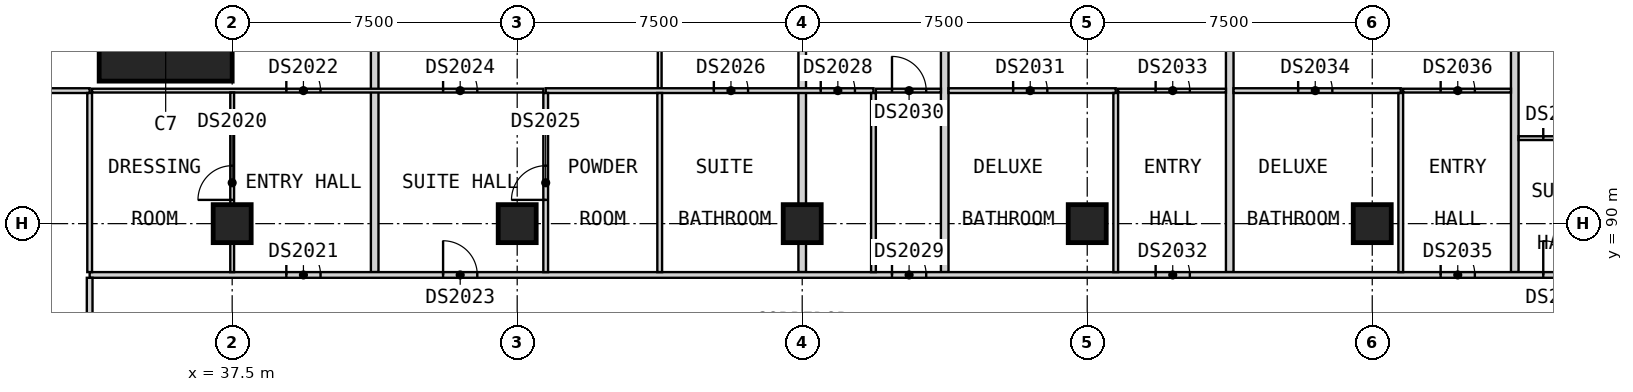
"""IFC4 building model, lengths in metres.
Left out: names, types, materials, properties, quantities, classifications, styles, units other than length and angle.
Written with IfcOpenShell. Run it as: python <this file> out.ifc"""

import sys

from ifc_helpers import new_model, si_unit, direction, frame, frame_2d, origin, origin_2d, place, context, subcontext, project, spatial, rectangle, extrude, element, fill, save


model = new_model("IFC4")
c1 = context("Model", 3, precision=1e-05, world=origin(), true_north=direction((0.0, 1.0)))
c2 = subcontext(c1, "Body", "Model", "MODEL_VIEW")
j1 = project(units=[si_unit("LENGTHUNIT", "METRE"), si_unit("PLANEANGLEUNIT", "RADIAN")], contexts=[c1])
p1 = place(None, origin())
s1 = spatial("IfcSite", under=j1, at=p1, CompositionType="ELEMENT")
p2 = place(p1, origin())
s2 = spatial("IfcBuilding", under=s1, at=p2, CompositionType="ELEMENT")
p3 = place(p2, frame((0.0, 0.0, 162.6)))
s3 = spatial("IfcBuildingStorey", under=s2, at=p3, CompositionType="ELEMENT", Elevation=162.6)
for number, where, z_axis, x_axis in (
    (1, (37.5, 90.0, 0.0), (0.0, 0.0, 1.0), (1.0, 0.0, 0.0)),
    (2, (45.0, 90.0, 0.0), (0.0, 0.0, 1.0), (1.0, 0.0, 0.0)),
    (3, (52.5, 90.0, 0.0), (0.0, 0.0, 1.0), (1.0, 0.0, 0.0)),
    (4, (60.0, 90.0, 0.0), (0.0, 0.0, 1.0), (1.0, 0.0, 0.0)),
    (5, (67.5, 90.0, 0.0), (0.0, 0.0, 1.0), (1.0, 0.0, 0.0)),
):
    element("IfcColumn", number, at=place(p3, frame(where, z_axis=z_axis, x_axis=x_axis)), inside=s3, PredefinedType="COLUMN", context=c2, shape_type="SweptSolid", body=[
        extrude(rectangle(XDim=1.0, YDim=1.0, at=origin_2d()), origin(), (0.0, 0.0, 1.0), 3.6),
    ])
p4 = place(p3, frame((35.75, 95.5, 0.0), z_axis=(0.0, 0.0, 1.0), x_axis=(1.0, 0.0, 0.0)))
e6 = element("IfcColumn", 6, at=p4, inside=s3, PredefinedType="COLUMN", context=c2, shape_type="SweptSolid", body=[
    extrude(rectangle(XDim=3.5, YDim=3.5, at=origin_2d()), origin(), (0.0, 0.0, 1.0), 3.6),
])
p5 = place(p3, frame((41.25, 88.725, 0.0), z_axis=(0.0, 0.0, 1.0), x_axis=(0.0, 1.0, 0.0)))
e7 = element("IfcWall", 7, at=p5, inside=s3, PredefinedType="PARTITIONING", context=c2, shape_type="SweptSolid", body=[
    extrude(rectangle(XDim=11.715, YDim=0.2, at=frame_2d((5.857, 0.0))), origin(), (0.0, 0.0, 1.0), 3.2),
])
p6 = place(p3, frame((52.5, 88.725, 0.0), z_axis=(0.0, 0.0, 1.0), x_axis=(0.0, 1.0, 0.0)))
e8 = element("IfcWall", 8, at=p6, inside=s3, PredefinedType="PARTITIONING", context=c2, shape_type="SweptSolid", body=[
    extrude(rectangle(XDim=12.525, YDim=0.2, at=frame_2d((6.262, 0.0))), origin(), (0.0, 0.0, 1.0), 3.2),
])
for number, where, z_axis, x_axis in (
    (9, (56.25, 88.725, 0.0), (0.0, 0.0, 1.0), (0.0, 1.0, 0.0)),
    (10, (63.75, 88.725, 0.0), (0.0, 0.0, 1.0), (0.0, 1.0, 0.0)),
    (11, (71.25, 88.725, 0.0), (0.0, 0.0, 1.0), (0.0, 1.0, 0.0)),
):
    element("IfcWall", number, at=place(p3, frame(where, z_axis=z_axis, x_axis=x_axis)), inside=s3, PredefinedType="PARTITIONING", context=c2, shape_type="SweptSolid", body=[
        extrude(rectangle(XDim=11.715, YDim=0.2, at=frame_2d((5.857, 0.0))), origin(), (0.0, 0.0, 1.0), 3.2),
    ])
p7 = place(p3, frame((33.75, 88.65, 0.0), z_axis=(0.0, 0.0, 1.0), x_axis=(1.0, 0.0, 0.0)))
e12 = element("IfcWall", 12, at=p7, inside=s3, PredefinedType="PARTITIONING", context=c2, shape_type="SweptSolid", body=[
    extrude(rectangle(XDim=39.9, YDim=0.15, at=frame_2d((19.95, 0.0))), origin(), (0.0, 0.0, 1.0), 3.2),
])
p8 = place(p7, frame((5.175, 0.0, 0.0)))
e13 = element("IfcOpeningElement", 13, at=p8, cuts=e12, PredefinedType="OPENING", context=c2, shape_type="SweptSolid", body=[
    extrude(rectangle(XDim=0.9, YDim=2.1, at=frame_2d((0.45, 1.05))), frame((0.0, 0.085, 0.0), z_axis=(0.0, -1.0, 0.0), x_axis=(1.0, 0.0, 0.0)), (0.0, 0.0, 1.0), 0.17),
])
p9 = place(p7, frame((9.3, 0.0, 0.0)))
e14 = element("IfcOpeningElement", 14, at=p9, cuts=e12, PredefinedType="OPENING", context=c2, shape_type="SweptSolid", body=[
    extrude(rectangle(XDim=0.9, YDim=2.1, at=frame_2d((0.45, 1.05))), frame((0.0, 0.085, 0.0), z_axis=(0.0, -1.0, 0.0), x_axis=(1.0, 0.0, 0.0)), (0.0, 0.0, 1.0), 0.17),
])
p10 = place(p7, frame((21.113, 0.0, 0.0)))
e15 = element("IfcOpeningElement", 15, at=p10, cuts=e12, PredefinedType="OPENING", context=c2, shape_type="SweptSolid", body=[
    extrude(rectangle(XDim=0.9, YDim=2.1, at=frame_2d((0.45, 1.05))), frame((0.0, 0.085, 0.0), z_axis=(0.0, -1.0, 0.0), x_axis=(1.0, 0.0, 0.0)), (0.0, 0.0, 1.0), 0.17),
])
p11 = place(p7, frame((28.05, 0.0, 0.0)))
e16 = element("IfcOpeningElement", 16, at=p11, cuts=e12, PredefinedType="OPENING", context=c2, shape_type="SweptSolid", body=[
    extrude(rectangle(XDim=0.9, YDim=2.1, at=frame_2d((0.45, 1.05))), frame((0.0, 0.085, 0.0), z_axis=(0.0, -1.0, 0.0), x_axis=(1.0, 0.0, 0.0)), (0.0, 0.0, 1.0), 0.17),
])
p12 = place(p7, frame((35.55, 0.0, 0.0)))
e17 = element("IfcOpeningElement", 17, at=p12, cuts=e12, PredefinedType="OPENING", context=c2, shape_type="SweptSolid", body=[
    extrude(rectangle(XDim=0.9, YDim=2.1, at=frame_2d((0.45, 1.05))), frame((0.0, 0.085, 0.0), z_axis=(0.0, -1.0, 0.0), x_axis=(1.0, 0.0, 0.0)), (0.0, 0.0, 1.0), 0.17),
])
p13 = place(p7, frame((38.25, 0.0, 0.0)))
e18 = element("IfcOpeningElement", 18, at=p13, cuts=e12, PredefinedType="OPENING", context=c2, shape_type="SweptSolid", body=[
    extrude(rectangle(XDim=0.9, YDim=2.1, at=frame_2d((0.45, 1.05))), frame((0.0, 0.085, 0.0), z_axis=(0.0, -1.0, 0.0), x_axis=(1.0, 0.0, 0.0)), (0.0, 0.0, 1.0), 0.17),
])
p14 = place(p3, frame((33.75, 86.35, 0.0), z_axis=(0.0, 0.0, 1.0), x_axis=(0.0, 1.0, 0.0)))
e19 = element("IfcWall", 19, at=p14, inside=s3, PredefinedType="PARTITIONING", context=c2, shape_type="SweptSolid", body=[
    extrude(rectangle(XDim=2.225, YDim=0.15, at=frame_2d((1.112, 0.0))), origin(), (0.0, 0.0, 1.0), 3.2),
])
p15 = place(p3, frame((71.35, 92.25, 0.0), z_axis=(0.0, 0.0, 1.0), x_axis=(1.0, 0.0, 0.0)))
e20 = element("IfcWall", 20, at=p15, inside=s3, PredefinedType="PARTITIONING", context=c2, shape_type="SweptSolid", body=[
    extrude(rectangle(XDim=7.35, YDim=0.1, at=frame_2d((3.675, 0.0))), origin(), (0.0, 0.0, 1.0), 3.2),
])
p16 = place(p15, frame((0.65, 0.0, 0.0)))
e21 = element("IfcOpeningElement", 21, at=p16, cuts=e20, PredefinedType="OPENING", context=c2, shape_type="SweptSolid", body=[
    extrude(rectangle(XDim=0.9, YDim=2.1, at=frame_2d((0.45, 1.05))), frame((0.0, 0.06, 0.0), z_axis=(0.0, -1.0, 0.0), x_axis=(1.0, 0.0, 0.0)), (0.0, 0.0, 1.0), 0.12),
])
p17 = place(p3, frame((33.812, 93.5, 0.0), z_axis=(0.0, 0.0, 1.0), x_axis=(1.0, 0.0, 0.0)))
e22 = element("IfcWall", 22, at=p17, inside=s3, PredefinedType="PARTITIONING", context=c2, shape_type="SweptSolid", body=[
    extrude(rectangle(XDim=11.875, YDim=0.1, at=frame_2d((5.938, 0.0))), origin(), (0.0, 0.0, 1.0), 3.2),
])
p18 = place(p17, frame((5.113, 0.0, 0.0)))
e23 = element("IfcOpeningElement", 23, at=p18, cuts=e22, PredefinedType="OPENING", context=c2, shape_type="SweptSolid", body=[
    extrude(rectangle(XDim=0.9, YDim=2.1, at=frame_2d((0.45, 1.05))), frame((0.0, 0.06, 0.0), z_axis=(0.0, -1.0, 0.0), x_axis=(1.0, 0.0, 0.0)), (0.0, 0.0, 1.0), 0.12),
])
p19 = place(p17, frame((9.238, 0.0, 0.0)))
e24 = element("IfcOpeningElement", 24, at=p19, cuts=e22, PredefinedType="OPENING", context=c2, shape_type="SweptSolid", body=[
    extrude(rectangle(XDim=0.9, YDim=2.1, at=frame_2d((0.45, 1.05))), frame((0.0, 0.06, 0.0), z_axis=(0.0, -1.0, 0.0), x_axis=(1.0, 0.0, 0.0)), (0.0, 0.0, 1.0), 0.12),
])
p20 = place(p3, frame((54.438, 93.5, 0.0), z_axis=(0.0, 0.0, 1.0), x_axis=(1.0, 0.0, 0.0)))
e25 = element("IfcWall", 25, at=p20, inside=s3, PredefinedType="PARTITIONING", context=c2, shape_type="SweptSolid", body=[
    extrude(rectangle(XDim=1.712, YDim=0.1, at=frame_2d((0.856, 0.0))), origin(), (0.0, 0.0, 1.0), 3.2),
])
p21 = place(p20, frame((0.425, 0.0, 0.0)))
e26 = element("IfcOpeningElement", 26, at=p21, cuts=e25, PredefinedType="OPENING", context=c2, shape_type="SweptSolid", body=[
    extrude(rectangle(XDim=0.9, YDim=2.1, at=frame_2d((0.45, 1.05))), frame((0.0, 0.06, 0.0), z_axis=(0.0, -1.0, 0.0), x_axis=(1.0, 0.0, 0.0)), (0.0, 0.0, 1.0), 0.12),
])
p22 = place(p3, frame((60.812, 93.5, 0.0), z_axis=(0.0, 0.0, 1.0), x_axis=(1.0, 0.0, 0.0)))
e27 = element("IfcWall", 27, at=p22, inside=s3, PredefinedType="PARTITIONING", context=c2, shape_type="SweptSolid", body=[
    extrude(rectangle(XDim=2.837, YDim=0.1, at=frame_2d((1.419, 0.0))), origin(), (0.0, 0.0, 1.0), 3.2),
])
p23 = place(p22, frame((0.988, 0.0, 0.0)))
e28 = element("IfcOpeningElement", 28, at=p23, cuts=e27, PredefinedType="OPENING", context=c2, shape_type="SweptSolid", body=[
    extrude(rectangle(XDim=0.9, YDim=2.1, at=frame_2d((0.45, 1.05))), frame((0.0, 0.06, 0.0), z_axis=(0.0, -1.0, 0.0), x_axis=(1.0, 0.0, 0.0)), (0.0, 0.0, 1.0), 0.12),
])
p24 = place(p3, frame((68.312, 93.5, 0.0), z_axis=(0.0, 0.0, 1.0), x_axis=(1.0, 0.0, 0.0)))
e29 = element("IfcWall", 29, at=p24, inside=s3, PredefinedType="PARTITIONING", context=c2, shape_type="SweptSolid", body=[
    extrude(rectangle(XDim=2.837, YDim=0.1, at=frame_2d((1.419, 0.0))), origin(), (0.0, 0.0, 1.0), 3.2),
])
p25 = place(p24, frame((0.988, 0.0, 0.0)))
e30 = element("IfcOpeningElement", 30, at=p25, cuts=e29, PredefinedType="OPENING", context=c2, shape_type="SweptSolid", body=[
    extrude(rectangle(XDim=0.9, YDim=2.1, at=frame_2d((0.45, 1.05))), frame((0.0, 0.06, 0.0), z_axis=(0.0, -1.0, 0.0), x_axis=(1.0, 0.0, 0.0)), (0.0, 0.0, 1.0), 0.12),
])
p26 = place(p3, frame((37.5, 88.725, 0.0), z_axis=(0.0, 0.0, 1.0), x_axis=(0.0, 1.0, 0.0)))
e31 = element("IfcWall", 31, at=p26, inside=s3, PredefinedType="PARTITIONING", context=c2, shape_type="SweptSolid", body=[
    extrude(rectangle(XDim=4.725, YDim=0.1, at=frame_2d((2.362, 0.0))), origin(), (0.0, 0.0, 1.0), 3.2),
])
p27 = place(p26, frame((1.9, 0.0, 0.0)))
e32 = element("IfcOpeningElement", 32, at=p27, cuts=e31, PredefinedType="OPENING", context=c2, shape_type="SweptSolid", body=[
    extrude(rectangle(XDim=0.9, YDim=2.1, at=frame_2d((0.45, 1.05))), frame((0.0, 0.06, 0.0), z_axis=(0.0, -1.0, 0.0), x_axis=(1.0, 0.0, 0.0)), (0.0, 0.0, 1.0), 0.12),
])
p28 = place(p3, frame((48.75, 93.562, 0.0), z_axis=(0.0, 0.0, 1.0), x_axis=(0.0, 1.0, 0.0)))
e33 = element("IfcWall", 33, at=p28, inside=s3, PredefinedType="PARTITIONING", context=c2, shape_type="SweptSolid", body=[
    extrude(rectangle(XDim=6.877, YDim=0.1, at=frame_2d((3.439, 0.0))), origin(), (0.0, 0.0, 1.0), 3.2),
])
p29 = place(p28, frame((3.363, 0.0, 0.0)))
e34 = element("IfcOpeningElement", 34, at=p29, cuts=e33, PredefinedType="OPENING", context=c2, shape_type="SweptSolid", body=[
    extrude(rectangle(XDim=0.9, YDim=2.1, at=frame_2d((0.45, 1.05))), frame((0.0, 0.06, 0.0), z_axis=(0.0, -1.0, 0.0), x_axis=(1.0, 0.0, 0.0)), (0.0, 0.0, 1.0), 0.12),
])
p30 = place(p3, frame((30.81, 93.5, 0.0), z_axis=(0.0, 0.0, 1.0), x_axis=(1.0, 0.0, 0.0)))
e35 = element("IfcWall", 35, at=p30, inside=s3, PredefinedType="PARTITIONING", context=c2, shape_type="SweptSolid", body=[
    extrude(rectangle(XDim=2.94, YDim=0.125, at=frame_2d((1.47, 0.0))), origin(), (0.0, 0.0, 1.0), 3.2),
])
p31 = place(p30, frame((0.615, 0.0, 0.0)))
e36 = element("IfcOpeningElement", 36, at=p31, cuts=e35, PredefinedType="OPENING", context=c2, shape_type="SweptSolid", body=[
    extrude(rectangle(XDim=0.9, YDim=2.1, at=frame_2d((0.45, 1.05))), frame((0.0, 0.073, 0.0), z_axis=(0.0, -1.0, 0.0), x_axis=(1.0, 0.0, 0.0)), (0.0, 0.0, 1.0), 0.145),
])
p32 = place(p3, frame((45.75, 93.5, 0.0), z_axis=(0.0, 0.0, 1.0), x_axis=(1.0, 0.0, 0.0)))
e37 = element("IfcWall", 37, at=p32, inside=s3, PredefinedType="PARTITIONING", context=c2, shape_type="SweptSolid", body=[
    extrude(rectangle(XDim=8.625, YDim=0.125, at=frame_2d((4.312, 0.0))), origin(), (0.0, 0.0, 1.0), 3.2),
])
p33 = place(p32, frame((4.425, 0.0, 0.0)))
e38 = element("IfcOpeningElement", 38, at=p33, cuts=e37, PredefinedType="OPENING", context=c2, shape_type="SweptSolid", body=[
    extrude(rectangle(XDim=0.9, YDim=2.1, at=frame_2d((0.45, 1.05))), frame((0.0, 0.073, 0.0), z_axis=(0.0, -1.0, 0.0), x_axis=(1.0, 0.0, 0.0)), (0.0, 0.0, 1.0), 0.145),
])
p34 = place(p32, frame((7.238, 0.0, 0.0)))
e39 = element("IfcOpeningElement", 39, at=p34, cuts=e37, PredefinedType="OPENING", context=c2, shape_type="SweptSolid", body=[
    extrude(rectangle(XDim=0.9, YDim=2.1, at=frame_2d((0.45, 1.05))), frame((0.0, 0.073, 0.0), z_axis=(0.0, -1.0, 0.0), x_axis=(1.0, 0.0, 0.0)), (0.0, 0.0, 1.0), 0.145),
])
p35 = place(p3, frame((56.35, 93.5, 0.0), z_axis=(0.0, 0.0, 1.0), x_axis=(1.0, 0.0, 0.0)))
e40 = element("IfcWall", 40, at=p35, inside=s3, PredefinedType="PARTITIONING", context=c2, shape_type="SweptSolid", body=[
    extrude(rectangle(XDim=4.4, YDim=0.125, at=frame_2d((2.2, 0.0))), origin(), (0.0, 0.0, 1.0), 3.2),
])
p36 = place(p35, frame((1.7, 0.0, 0.0)))
e41 = element("IfcOpeningElement", 41, at=p36, cuts=e40, PredefinedType="OPENING", context=c2, shape_type="SweptSolid", body=[
    extrude(rectangle(XDim=0.9, YDim=2.1, at=frame_2d((0.45, 1.05))), frame((0.0, 0.073, 0.0), z_axis=(0.0, -1.0, 0.0), x_axis=(1.0, 0.0, 0.0)), (0.0, 0.0, 1.0), 0.145),
])
p37 = place(p3, frame((63.85, 93.5, 0.0), z_axis=(0.0, 0.0, 1.0), x_axis=(1.0, 0.0, 0.0)))
e42 = element("IfcWall", 42, at=p37, inside=s3, PredefinedType="PARTITIONING", context=c2, shape_type="SweptSolid", body=[
    extrude(rectangle(XDim=4.4, YDim=0.125, at=frame_2d((2.2, 0.0))), origin(), (0.0, 0.0, 1.0), 3.2),
])
p38 = place(p37, frame((1.7, 0.0, 0.0)))
e43 = element("IfcOpeningElement", 43, at=p38, cuts=e42, PredefinedType="OPENING", context=c2, shape_type="SweptSolid", body=[
    extrude(rectangle(XDim=0.9, YDim=2.1, at=frame_2d((0.45, 1.05))), frame((0.0, 0.073, 0.0), z_axis=(0.0, -1.0, 0.0), x_axis=(1.0, 0.0, 0.0)), (0.0, 0.0, 1.0), 0.145),
])
p39 = place(p3, frame((33.75, 88.725, 0.0), z_axis=(0.0, 0.0, 1.0), x_axis=(0.0, 1.0, 0.0)))
e44 = element("IfcWall", 44, at=p39, inside=s3, PredefinedType="PARTITIONING", context=c2, shape_type="SweptSolid", body=[
    extrude(rectangle(XDim=4.712, YDim=0.125, at=frame_2d((2.356, 0.0))), origin(), (0.0, 0.0, 1.0), 3.2),
])
p40 = place(p3, frame((45.75, 88.725, 0.0), z_axis=(0.0, 0.0, 1.0), x_axis=(0.0, 1.0, 0.0)))
e45 = element("IfcWall", 45, at=p40, inside=s3, PredefinedType="PARTITIONING", context=c2, shape_type="SweptSolid", body=[
    extrude(rectangle(XDim=4.712, YDim=0.125, at=frame_2d((2.356, 0.0))), origin(), (0.0, 0.0, 1.0), 3.2),
])
p41 = place(p40, frame((1.9, 0.0, 0.0)))
e46 = element("IfcOpeningElement", 46, at=p41, cuts=e45, PredefinedType="OPENING", context=c2, shape_type="SweptSolid", body=[
    extrude(rectangle(XDim=0.9, YDim=2.1, at=frame_2d((0.45, 1.05))), frame((0.0, 0.073, 0.0), z_axis=(0.0, -1.0, 0.0), x_axis=(1.0, 0.0, 0.0)), (0.0, 0.0, 1.0), 0.145),
])
for number, where, z_axis, x_axis in (
    (47, (48.75, 88.725, 0.0), (0.0, 0.0, 1.0), (0.0, 1.0, 0.0)),
    (48, (54.375, 88.725, 0.0), (0.0, 0.0, 1.0), (0.0, 1.0, 0.0)),
    (49, (60.75, 88.725, 0.0), (0.0, 0.0, 1.0), (0.0, 1.0, 0.0)),
    (50, (68.25, 88.725, 0.0), (0.0, 0.0, 1.0), (0.0, 1.0, 0.0)),
):
    element("IfcWall", number, at=place(p3, frame(where, z_axis=z_axis, x_axis=x_axis)), inside=s3, PredefinedType="PARTITIONING", context=c2, shape_type="SweptSolid", body=[
        extrude(rectangle(XDim=4.712, YDim=0.125, at=frame_2d((2.356, 0.0))), origin(), (0.0, 0.0, 1.0), 3.2),
    ])
p42 = place(p27, origin())
e51 = element("IfcDoor", 51, at=p42, inside=s3, OperationType="SINGLE_SWING_RIGHT", PredefinedType="DOOR", context=c2, shape_type="SweptSolid", body=[
    extrude(rectangle(XDim=0.9, YDim=2.1, at=frame_2d((0.45, 1.05))), frame((0.0, 0.025, 0.0), z_axis=(0.0, -1.0, 0.0), x_axis=(1.0, 0.0, 0.0)), (0.0, 0.0, 1.0), 0.05),
])
fill(e32, e51)
p43 = place(p8, origin())
e52 = element("IfcDoor", 52, at=p43, inside=s3, OperationType="SINGLE_SWING_LEFT", PredefinedType="DOOR", context=c2, shape_type="SweptSolid", body=[
    extrude(rectangle(XDim=0.9, YDim=2.1, at=frame_2d((0.45, 1.05))), frame((0.0, 0.025, 0.0), z_axis=(0.0, -1.0, 0.0), x_axis=(1.0, 0.0, 0.0)), (0.0, 0.0, 1.0), 0.05),
])
fill(e13, e52)
p44 = place(p18, origin())
e53 = element("IfcDoor", 53, at=p44, inside=s3, OperationType="SINGLE_SWING_RIGHT", PredefinedType="DOOR", context=c2, shape_type="SweptSolid", body=[
    extrude(rectangle(XDim=0.9, YDim=2.1, at=frame_2d((0.45, 1.05))), frame((0.0, 0.025, 0.0), z_axis=(0.0, -1.0, 0.0), x_axis=(1.0, 0.0, 0.0)), (0.0, 0.0, 1.0), 0.05),
])
fill(e23, e53)
p45 = place(p9, origin())
e54 = element("IfcDoor", 54, at=p45, inside=s3, OperationType="SINGLE_SWING_LEFT", PredefinedType="DOOR", context=c2, shape_type="SweptSolid", body=[
    extrude(rectangle(XDim=0.9, YDim=2.1, at=frame_2d((0.45, 1.05))), frame((0.0, 0.025, 0.0), z_axis=(0.0, -1.0, 0.0), x_axis=(1.0, 0.0, 0.0)), (0.0, 0.0, 1.0), 0.05),
])
fill(e14, e54)
p46 = place(p19, origin())
e55 = element("IfcDoor", 55, at=p46, inside=s3, OperationType="SINGLE_SWING_RIGHT", PredefinedType="DOOR", context=c2, shape_type="SweptSolid", body=[
    extrude(rectangle(XDim=0.9, YDim=2.1, at=frame_2d((0.45, 1.05))), frame((0.0, 0.025, 0.0), z_axis=(0.0, -1.0, 0.0), x_axis=(1.0, 0.0, 0.0)), (0.0, 0.0, 1.0), 0.05),
])
fill(e24, e55)
p47 = place(p41, origin())
e56 = element("IfcDoor", 56, at=p47, inside=s3, OperationType="SINGLE_SWING_LEFT", PredefinedType="DOOR", context=c2, shape_type="SweptSolid", body=[
    extrude(rectangle(XDim=0.9, YDim=2.1, at=frame_2d((0.45, 1.05))), frame((0.0, 0.025, 0.0), z_axis=(0.0, -1.0, 0.0), x_axis=(1.0, 0.0, 0.0)), (0.0, 0.0, 1.0), 0.05),
])
fill(e46, e56)
p48 = place(p33, origin())
e57 = element("IfcDoor", 57, at=p48, inside=s3, OperationType="SINGLE_SWING_RIGHT", PredefinedType="DOOR", context=c2, shape_type="SweptSolid", body=[
    extrude(rectangle(XDim=0.9, YDim=2.1, at=frame_2d((0.45, 1.05))), frame((0.0, 0.025, 0.0), z_axis=(0.0, -1.0, 0.0), x_axis=(1.0, 0.0, 0.0)), (0.0, 0.0, 1.0), 0.05),
])
fill(e38, e57)
p49 = place(p34, origin())
e58 = element("IfcDoor", 58, at=p49, inside=s3, OperationType="SINGLE_SWING_RIGHT", PredefinedType="DOOR", context=c2, shape_type="SweptSolid", body=[
    extrude(rectangle(XDim=0.9, YDim=2.1, at=frame_2d((0.45, 1.05))), frame((0.0, 0.025, 0.0), z_axis=(0.0, -1.0, 0.0), x_axis=(1.0, 0.0, 0.0)), (0.0, 0.0, 1.0), 0.05),
])
fill(e39, e58)
p50 = place(p10, origin())
e59 = element("IfcDoor", 59, at=p50, inside=s3, OperationType="SINGLE_SWING_LEFT", PredefinedType="DOOR", context=c2, shape_type="SweptSolid", body=[
    extrude(rectangle(XDim=0.9, YDim=2.1, at=frame_2d((0.45, 1.05))), frame((0.0, 0.025, 0.0), z_axis=(0.0, -1.0, 0.0), x_axis=(1.0, 0.0, 0.0)), (0.0, 0.0, 1.0), 0.05),
])
fill(e15, e59)
p51 = place(p21, origin())
e60 = element("IfcDoor", 60, at=p51, inside=s3, OperationType="SINGLE_SWING_RIGHT", PredefinedType="DOOR", context=c2, shape_type="SweptSolid", body=[
    extrude(rectangle(XDim=0.9, YDim=2.1, at=frame_2d((0.45, 1.05))), frame((0.0, 0.025, 0.0), z_axis=(0.0, -1.0, 0.0), x_axis=(1.0, 0.0, 0.0)), (0.0, 0.0, 1.0), 0.05),
])
fill(e26, e60)
p52 = place(p36, origin())
e61 = element("IfcDoor", 61, at=p52, inside=s3, OperationType="SINGLE_SWING_RIGHT", PredefinedType="DOOR", context=c2, shape_type="SweptSolid", body=[
    extrude(rectangle(XDim=0.9, YDim=2.1, at=frame_2d((0.45, 1.05))), frame((0.0, 0.025, 0.0), z_axis=(0.0, -1.0, 0.0), x_axis=(1.0, 0.0, 0.0)), (0.0, 0.0, 1.0), 0.05),
])
fill(e41, e61)
p53 = place(p11, origin())
e62 = element("IfcDoor", 62, at=p53, inside=s3, OperationType="SINGLE_SWING_LEFT", PredefinedType="DOOR", context=c2, shape_type="SweptSolid", body=[
    extrude(rectangle(XDim=0.9, YDim=2.1, at=frame_2d((0.45, 1.05))), frame((0.0, 0.025, 0.0), z_axis=(0.0, -1.0, 0.0), x_axis=(1.0, 0.0, 0.0)), (0.0, 0.0, 1.0), 0.05),
])
fill(e16, e62)
p54 = place(p23, origin())
e63 = element("IfcDoor", 63, at=p54, inside=s3, OperationType="SINGLE_SWING_RIGHT", PredefinedType="DOOR", context=c2, shape_type="SweptSolid", body=[
    extrude(rectangle(XDim=0.9, YDim=2.1, at=frame_2d((0.45, 1.05))), frame((0.0, 0.025, 0.0), z_axis=(0.0, -1.0, 0.0), x_axis=(1.0, 0.0, 0.0)), (0.0, 0.0, 1.0), 0.05),
])
fill(e28, e63)
p55 = place(p38, origin())
e64 = element("IfcDoor", 64, at=p55, inside=s3, OperationType="SINGLE_SWING_RIGHT", PredefinedType="DOOR", context=c2, shape_type="SweptSolid", body=[
    extrude(rectangle(XDim=0.9, YDim=2.1, at=frame_2d((0.45, 1.05))), frame((0.0, 0.025, 0.0), z_axis=(0.0, -1.0, 0.0), x_axis=(1.0, 0.0, 0.0)), (0.0, 0.0, 1.0), 0.05),
])
fill(e43, e64)
p56 = place(p12, origin())
e65 = element("IfcDoor", 65, at=p56, inside=s3, OperationType="SINGLE_SWING_LEFT", PredefinedType="DOOR", context=c2, shape_type="SweptSolid", body=[
    extrude(rectangle(XDim=0.9, YDim=2.1, at=frame_2d((0.45, 1.05))), frame((0.0, 0.025, 0.0), z_axis=(0.0, -1.0, 0.0), x_axis=(1.0, 0.0, 0.0)), (0.0, 0.0, 1.0), 0.05),
])
fill(e17, e65)
p57 = place(p25, origin())
e66 = element("IfcDoor", 66, at=p57, inside=s3, OperationType="SINGLE_SWING_RIGHT", PredefinedType="DOOR", context=c2, shape_type="SweptSolid", body=[
    extrude(rectangle(XDim=0.9, YDim=2.1, at=frame_2d((0.45, 1.05))), frame((0.0, 0.025, 0.0), z_axis=(0.0, -1.0, 0.0), x_axis=(1.0, 0.0, 0.0)), (0.0, 0.0, 1.0), 0.05),
])
fill(e30, e66)
p58 = place(p13, origin())
e67 = element("IfcDoor", 67, at=p58, inside=s3, OperationType="SINGLE_SWING_RIGHT", PredefinedType="DOOR", context=c2, shape_type="SweptSolid", body=[
    extrude(rectangle(XDim=0.9, YDim=2.1, at=frame_2d((0.45, 1.05))), frame((0.0, 0.025, 0.0), z_axis=(0.0, -1.0, 0.0), x_axis=(1.0, 0.0, 0.0)), (0.0, 0.0, 1.0), 0.05),
])
fill(e18, e67)
p59 = place(p16, origin())
e68 = element("IfcDoor", 68, at=p59, inside=s3, OperationType="SINGLE_SWING_LEFT", PredefinedType="DOOR", context=c2, shape_type="SweptSolid", body=[
    extrude(rectangle(XDim=0.9, YDim=2.1, at=frame_2d((0.45, 1.05))), frame((0.0, 0.025, 0.0), z_axis=(0.0, -1.0, 0.0), x_axis=(1.0, 0.0, 0.0)), (0.0, 0.0, 1.0), 0.05),
])
fill(e21, e68)
save(model, sys.argv[1])
